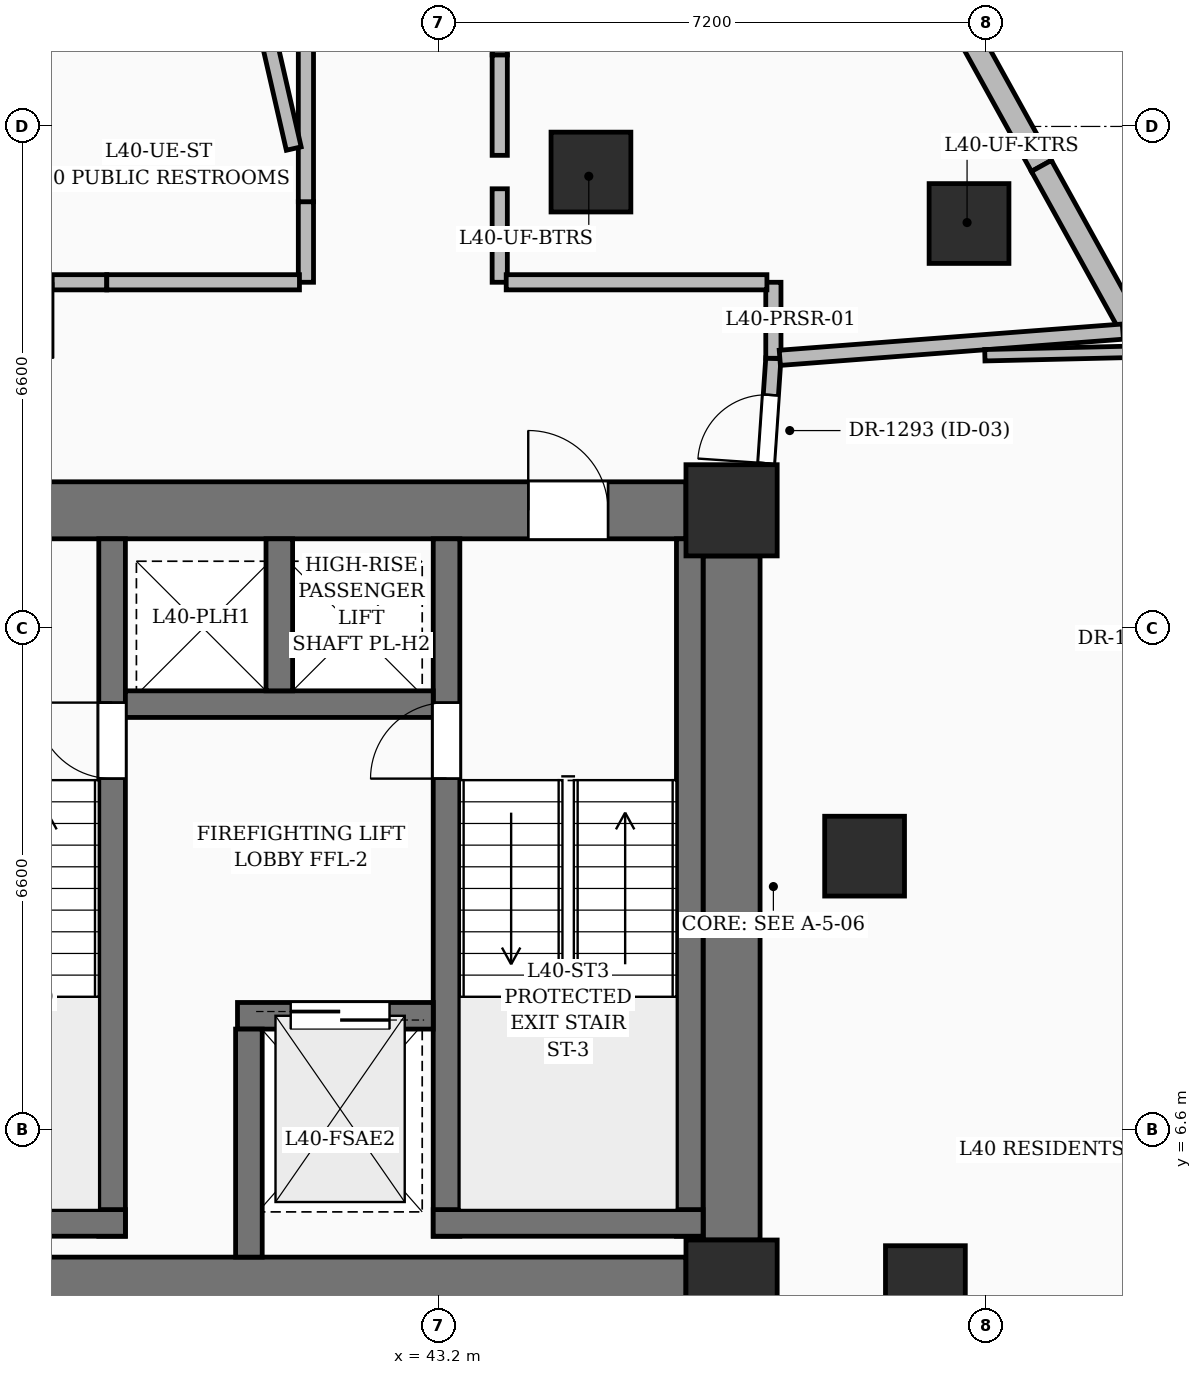
"""IFC4 building model, lengths in metres.
Left out: names, types, materials, properties, quantities, classifications, styles, units other than length and angle.
Written with IfcOpenShell. Run it as: python <this file> out.ifc"""

import sys

from ifc_helpers import new_model, si_unit, direction, frame, frame_2d, origin, origin_2d, place, context, subcontext, project, spatial, rectangle, extrude, element, fill, save


model = new_model("IFC4")
c1 = context("Model", 3, precision=1e-05, world=origin(), true_north=direction((0.0, 1.0)))
c2 = subcontext(c1, "Body", "Model", "MODEL_VIEW")
j1 = project(units=[si_unit("LENGTHUNIT", "METRE"), si_unit("PLANEANGLEUNIT", "RADIAN")], contexts=[c1])
p1 = place(None, origin())
s1 = spatial("IfcSite", under=j1, at=p1, CompositionType="ELEMENT")
p2 = place(p1, origin())
s2 = spatial("IfcBuilding", under=s1, at=p2, CompositionType="ELEMENT")
p3 = place(p2, frame((0.0, 0.0, 157.2)))
s3 = spatial("IfcBuildingStorey", under=s2, at=p3, CompositionType="ELEMENT", Elevation=157.2)
for number, where, z_axis, x_axis in (
    (1, (47.05, 4.55, 0.0), (0.0, 0.0, 1.0), (1.0, 0.0, 0.0)),
    (2, (47.05, 14.75, 0.0), (0.0, 0.0, 1.0), (1.0, 0.0, 0.0)),
):
    element("IfcColumn", number, at=place(p3, frame(where, z_axis=z_axis, x_axis=x_axis)), inside=s3, PredefinedType="COLUMN", context=c2, shape_type="SweptSolid", body=[
        extrude(rectangle(XDim=1.2, YDim=1.2, at=origin_2d()), origin(), (0.0, 0.0, 1.0), 3.6),
    ])
for number, where, z_axis, x_axis in (
    (3, (49.6, 4.55, 0.0), (0.0, 0.0, 1.0), (1.0, 0.0, 0.0)),
    (4, (48.8, 10.2, 0.0), (0.0, 0.0, 1.0), (1.0, 0.0, 0.0)),
    (5, (45.2, 19.2, 0.0), (0.0, 0.0, 1.0), (1.0, 0.0, 0.0)),
):
    element("IfcColumn", number, at=place(p3, frame(where, z_axis=z_axis, x_axis=x_axis)), inside=s3, PredefinedType="COLUMN", context=c2, shape_type="SweptSolid", body=[
        extrude(rectangle(XDim=1.05, YDim=1.05, at=origin_2d()), origin(), (0.0, 0.0, 1.0), 3.6),
    ])
p4 = place(p3, frame((35.75, 4.55, 0.0), z_axis=(0.0, 0.0, 1.0), x_axis=(1.0, 0.0, 0.0)))
e6 = element("IfcWall", 6, at=p4, inside=s3, PredefinedType="SHEAR", context=c2, shape_type="SweptSolid", body=[
    extrude(rectangle(XDim=10.7, YDim=0.75, at=frame_2d((5.35, 0.0))), origin(), (0.0, 0.0, 1.0), 3.6),
])
p5 = place(p3, frame((35.75, 14.75, 0.0), z_axis=(0.0, 0.0, 1.0), x_axis=(1.0, 0.0, 0.0)))
e7 = element("IfcWall", 7, at=p5, inside=s3, PredefinedType="SHEAR", context=c2, shape_type="SweptSolid", body=[
    extrude(rectangle(XDim=10.7, YDim=0.75, at=frame_2d((5.35, 0.0))), origin(), (0.0, 0.0, 1.0), 3.6),
])
p6 = place(p5, frame((1.025, 0.0, 0.0)))
e8 = element("IfcOpeningElement", 8, at=p6, cuts=e7, PredefinedType="OPENING", context=c2, shape_type="SweptSolid", body=[
    extrude(rectangle(XDim=1.05, YDim=2.15, at=frame_2d((0.525, 1.075))), frame((0.0, 0.385, 0.0), z_axis=(0.0, -1.0, 0.0), x_axis=(1.0, 0.0, 0.0)), (0.0, 0.0, 1.0), 0.77),
])
p7 = place(p5, frame((8.625, 0.0, 0.0)))
e9 = element("IfcOpeningElement", 9, at=p7, cuts=e7, PredefinedType="OPENING", context=c2, shape_type="SweptSolid", body=[
    extrude(rectangle(XDim=1.05, YDim=2.15, at=frame_2d((0.525, 1.075))), frame((0.0, 0.385, 0.0), z_axis=(0.0, -1.0, 0.0), x_axis=(1.0, 0.0, 0.0)), (0.0, 0.0, 1.0), 0.77),
])
p8 = place(p3, frame((47.05, 5.15, 0.0), z_axis=(0.0, 0.0, 1.0), x_axis=(0.0, 1.0, 0.0)))
e10 = element("IfcWall", 10, at=p8, inside=s3, PredefinedType="SHEAR", context=c2, shape_type="SweptSolid", body=[
    extrude(rectangle(XDim=9.0, YDim=0.75, at=frame_2d((4.5, 0.0))), origin(), (0.0, 0.0, 1.0), 3.6),
])
p9 = place(p3, frame((38.9, 5.2, 0.0), z_axis=(0.0, 0.0, 1.0), x_axis=(0.0, 1.0, 0.0)))
e11 = element("IfcWall", 11, at=p9, inside=s3, PredefinedType="SOLIDWALL", context=c2, shape_type="SweptSolid", body=[
    extrude(rectangle(XDim=9.175, YDim=0.35, at=frame_2d((4.587, 0.0))), origin(), (0.0, 0.0, 1.0), 3.6),
])
p10 = place(p9, frame((6.02, 0.0, 0.0)))
e12 = element("IfcOpeningElement", 12, at=p10, cuts=e11, PredefinedType="OPENING", context=c2, shape_type="SweptSolid", body=[
    extrude(rectangle(XDim=1.0, YDim=2.15, at=frame_2d((0.5, 1.075))), frame((0.0, 0.185, 0.0), z_axis=(0.0, -1.0, 0.0), x_axis=(1.0, 0.0, 0.0)), (0.0, 0.0, 1.0), 0.37),
])
p11 = place(p3, frame((35.525, 5.375, 0.0), z_axis=(0.0, 0.0, 1.0), x_axis=(1.0, 0.0, 0.0)))
e13 = element("IfcWall", 13, at=p11, inside=s3, PredefinedType="SOLIDWALL", context=c2, shape_type="SweptSolid", body=[
    extrude(rectangle(XDim=3.55, YDim=0.35, at=frame_2d((1.775, 0.0))), origin(), (0.0, 0.0, 1.0), 3.6),
])
p12 = place(p3, frame((43.3, 5.2, 0.0), z_axis=(0.0, 0.0, 1.0), x_axis=(0.0, 1.0, 0.0)))
e14 = element("IfcWall", 14, at=p12, inside=s3, PredefinedType="SOLIDWALL", context=c2, shape_type="SweptSolid", body=[
    extrude(rectangle(XDim=9.175, YDim=0.35, at=frame_2d((4.587, 0.0))), origin(), (0.0, 0.0, 1.0), 3.6),
])
p13 = place(p12, frame((6.02, 0.0, 0.0)))
e15 = element("IfcOpeningElement", 15, at=p13, cuts=e14, PredefinedType="OPENING", context=c2, shape_type="SweptSolid", body=[
    extrude(rectangle(XDim=1.0, YDim=2.15, at=frame_2d((0.5, 1.075))), frame((0.0, 0.185, 0.0), z_axis=(0.0, -1.0, 0.0), x_axis=(1.0, 0.0, 0.0)), (0.0, 0.0, 1.0), 0.37),
])
p14 = place(p3, frame((46.5, 5.2, 0.0), z_axis=(0.0, 0.0, 1.0), x_axis=(0.0, 1.0, 0.0)))
e16 = element("IfcWall", 16, at=p14, inside=s3, PredefinedType="SOLIDWALL", context=c2, shape_type="SweptSolid", body=[
    extrude(rectangle(XDim=9.175, YDim=0.35, at=frame_2d((4.587, 0.0))), origin(), (0.0, 0.0, 1.0), 3.6),
])
p15 = place(p3, frame((43.125, 5.375, 0.0), z_axis=(0.0, 0.0, 1.0), x_axis=(1.0, 0.0, 0.0)))
e17 = element("IfcWall", 17, at=p15, inside=s3, PredefinedType="SOLIDWALL", context=c2, shape_type="SweptSolid", body=[
    extrude(rectangle(XDim=3.55, YDim=0.35, at=frame_2d((1.775, 0.0))), origin(), (0.0, 0.0, 1.0), 3.6),
])
p16 = place(p3, frame((40.55, 8.1, 0.0), z_axis=(0.0, 0.0, 1.0), x_axis=(1.0, 0.0, 0.0)))
e18 = element("IfcWall", 18, at=p16, inside=s3, PredefinedType="SOLIDWALL", context=c2, shape_type="SweptSolid", body=[
    extrude(rectangle(XDim=2.575, YDim=0.35, at=frame_2d((1.288, 0.0))), origin(), (0.0, 0.0, 1.0), 3.6),
])
p17 = place(p16, frame((0.7, 0.0, 0.0)))
e19 = element("IfcOpeningElement", 19, at=p17, cuts=e18, PredefinedType="OPENING", context=c2, shape_type="SweptSolid", body=[
    extrude(rectangle(XDim=1.3, YDim=2.25, at=frame_2d((0.65, 1.125))), frame((0.0, 0.185, 0.0), z_axis=(0.0, -1.0, 0.0), x_axis=(1.0, 0.0, 0.0)), (0.0, 0.0, 1.0), 0.37),
])
p18 = place(p3, frame((40.7, 4.925, 0.0), z_axis=(0.0, 0.0, 1.0), x_axis=(0.0, 1.0, 0.0)))
e20 = element("IfcWall", 20, at=p18, inside=s3, PredefinedType="SOLIDWALL", context=c2, shape_type="SweptSolid", body=[
    extrude(rectangle(XDim=3.0, YDim=0.35, at=frame_2d((1.5, 0.0))), origin(), (0.0, 0.0, 1.0), 3.6),
])
p19 = place(p3, frame((39.075, 12.2, 0.0), z_axis=(0.0, 0.0, 1.0), x_axis=(1.0, 0.0, 0.0)))
e21 = element("IfcWall", 21, at=p19, inside=s3, PredefinedType="SOLIDWALL", context=c2, shape_type="SweptSolid", body=[
    extrude(rectangle(XDim=4.05, YDim=0.35, at=frame_2d((2.025, 0.0))), origin(), (0.0, 0.0, 1.0), 3.6),
])
p20 = place(p3, frame((41.1, 12.375, 0.0), z_axis=(0.0, 0.0, 1.0), x_axis=(0.0, 1.0, 0.0)))
e22 = element("IfcWall", 22, at=p20, inside=s3, PredefinedType="SOLIDWALL", context=c2, shape_type="SweptSolid", body=[
    extrude(rectangle(XDim=2.0, YDim=0.35, at=frame_2d((1.0, 0.0))), origin(), (0.0, 0.0, 1.0), 3.6),
])
p21 = place(p3, frame((50.174, 18.523, 0.0), z_axis=(0.0, 0.0, 1.0), x_axis=(1.0, 0.0, 0.0)))
e23 = element("IfcColumn", 23, at=p21, inside=s3, PredefinedType="COLUMN", context=c2, shape_type="SweptSolid", body=[
    extrude(rectangle(XDim=1.05, YDim=1.05, at=origin_2d()), origin(), (0.0, 0.0, 1.0), 3.6),
])
p22 = place(p3, frame((47.36, 26.087, 0.0), z_axis=(0.0, 0.0, 1.0), x_axis=(0.484182040501, -0.874967286049, 0.0)))
e24 = element("IfcWall", 24, at=p22, inside=s3, PredefinedType="SOLIDWALL", context=c2, shape_type="SweptSolid", body=[
    extrude(rectangle(XDim=7.779, YDim=0.3, at=frame_2d((3.89, 0.0))), origin(), (0.0, 0.0, 1.0), 3.35),
])
p23 = place(p22, frame((2.295, 0.0, 0.6)))
e25 = element("IfcOpeningElement", 25, at=p23, cuts=e24, PredefinedType="OPENING", context=c2, shape_type="SweptSolid", body=[
    extrude(rectangle(XDim=2.4, YDim=2.1, at=frame_2d((1.2, 1.05))), frame((0.0, 0.16, 0.0), z_axis=(0.0, -1.0, 0.0), x_axis=(1.0, 0.0, 0.0)), (0.0, 0.0, 1.0), 0.32),
])
p24 = place(p3, frame((51.126, 19.281, 0.0), z_axis=(0.0, 0.0, 1.0), x_axis=(0.484181305153, -0.87496769297, 0.0)))
e26 = element("IfcWall", 26, at=p24, inside=s3, PredefinedType="SOLIDWALL", context=c2, shape_type="SweptSolid", body=[
    extrude(rectangle(XDim=8.059, YDim=0.3, at=frame_2d((4.03, 0.0))), origin(), (0.0, 0.0, 1.0), 3.35),
])
p25 = place(p24, frame((5.335, 0.0, 0.0)))
e27 = element("IfcOpeningElement", 27, at=p25, cuts=e26, PredefinedType="OPENING", context=c2, shape_type="SweptSolid", body=[
    extrude(rectangle(XDim=1.0, YDim=2.2, at=frame_2d((0.5, 1.1))), frame((0.0, 0.16, 0.0), z_axis=(0.0, -1.0, 0.0), x_axis=(1.0, 0.0, 0.0)), (0.0, 0.0, 1.0), 0.32),
])
p26 = place(p3, frame((47.425, 14.2, 0.0), z_axis=(0.0, 0.0, 1.0), x_axis=(0.068484119878, 0.997652206595, 0.0)))
e28 = element("IfcWall", 28, at=p26, inside=s3, PredefinedType="PARTITIONING", context=c2, shape_type="SweptSolid", body=[
    extrude(rectangle(XDim=2.556, YDim=0.2, at=frame_2d((1.278, 0.0))), origin(), (0.0, 0.0, 1.0), 2.393),
])
p27 = place(p26, frame((1.172, 0.0, 0.0)))
e29 = element("IfcOpeningElement", 29, at=p27, cuts=e28, PredefinedType="OPENING", context=c2, shape_type="SweptSolid", body=[
    extrude(rectangle(XDim=0.9, YDim=2.1, at=frame_2d((0.45, 1.05))), frame((0.0, 0.11, 0.0), z_axis=(0.0, -1.0, 0.0), x_axis=(1.0, 0.0, 0.0)), (0.0, 0.0, 1.0), 0.22),
])
p28 = place(p3, frame((38.83, 17.75, 0.0), z_axis=(0.0, 0.0, 1.0), x_axis=(-1.0, 0.0, 0.0)))
e30 = element("IfcWall", 30, at=p28, inside=s3, PredefinedType="PARTITIONING", context=c2, shape_type="SweptSolid", body=[
    extrude(rectangle(XDim=2.41, YDim=0.2, at=frame_2d((1.205, 0.0))), origin(), (0.0, 0.0, 1.0), 3.35),
])
p29 = place(p28, frame((0.705, 0.0, 0.0)))
e31 = element("IfcOpeningElement", 31, at=p29, cuts=e30, PredefinedType="OPENING", context=c2, shape_type="SweptSolid", body=[
    extrude(rectangle(XDim=1.0, YDim=2.2, at=frame_2d((0.5, 1.1))), frame((0.0, 0.11, 0.0), z_axis=(0.0, -1.0, 0.0), x_axis=(1.0, 0.0, 0.0)), (0.0, 0.0, 1.0), 0.22),
])
p30 = place(p3, frame((41.45, 18.81, 0.0), z_axis=(0.0, 0.0, 1.0), x_axis=(0.0, -1.0, 0.0)))
e32 = element("IfcWall", 32, at=p30, inside=s3, PredefinedType="PARTITIONING", context=c2, shape_type="SweptSolid", body=[
    extrude(rectangle(XDim=1.06, YDim=0.2, at=frame_2d((0.53, 0.0))), origin(), (0.0, 0.0, 1.0), 3.35),
])
p31 = place(p3, frame((41.365, 17.75, 0.0), z_axis=(0.0, 0.0, 1.0), x_axis=(-1.0, 0.0, 0.0)))
e33 = element("IfcWall", 33, at=p31, inside=s3, PredefinedType="PARTITIONING", context=c2, shape_type="SweptSolid", body=[
    extrude(rectangle(XDim=2.535, YDim=0.2, at=frame_2d((1.268, 0.0))), origin(), (0.0, 0.0, 1.0), 3.35),
])
p32 = place(p3, frame((44.0, 20.74, 0.0), z_axis=(0.0, 0.0, 1.0), x_axis=(0.0, 1.0, 0.0)))
e34 = element("IfcWall", 34, at=p32, inside=s3, PredefinedType="PARTITIONING", context=c2, shape_type="SweptSolid", body=[
    extrude(rectangle(XDim=2.86, YDim=0.2, at=frame_2d((1.43, 0.0))), origin(), (0.0, 0.0, 1.0), 2.436),
])
p33 = place(p32, frame((0.93, 0.0, 0.0)))
e35 = element("IfcOpeningElement", 35, at=p33, cuts=e34, PredefinedType="OPENING", context=c2, shape_type="SweptSolid", body=[
    extrude(rectangle(XDim=1.0, YDim=2.2, at=frame_2d((0.5, 1.1))), frame((0.0, 0.11, 0.0), z_axis=(0.0, -1.0, 0.0), x_axis=(1.0, 0.0, 0.0)), (0.0, 0.0, 1.0), 0.22),
])
p34 = place(p3, frame((47.6, 16.75, 0.0), z_axis=(0.0, 0.0, 1.0), x_axis=(0.0, 1.0, 0.0)))
e36 = element("IfcWall", 36, at=p34, inside=s3, PredefinedType="PARTITIONING", context=c2, shape_type="SweptSolid", body=[
    extrude(rectangle(XDim=1.0, YDim=0.2, at=frame_2d((0.5, 0.0))), origin(), (0.0, 0.0, 1.0), 3.01),
])
p35 = place(p3, frame((44.0, 17.75, 0.0), z_axis=(0.0, 0.0, 1.0), x_axis=(0.0, 1.0, 0.0)))
e37 = element("IfcWall", 37, at=p35, inside=s3, PredefinedType="PARTITIONING", context=c2, shape_type="SweptSolid", body=[
    extrude(rectangle(XDim=1.23, YDim=0.2, at=frame_2d((0.615, 0.0))), origin(), (0.0, 0.0, 1.0), 3.35),
])
p36 = place(p3, frame((41.45, 23.515, 0.0), z_axis=(0.0, 0.0, 1.0), x_axis=(0.0, -1.0, 0.0)))
e38 = element("IfcWall", 38, at=p36, inside=s3, PredefinedType="PARTITIONING", context=c2, shape_type="SweptSolid", body=[
    extrude(rectangle(XDim=4.705, YDim=0.2, at=frame_2d((2.353, 0.0))), origin(), (0.0, 0.0, 1.0), 3.35),
])
p37 = place(p36, frame((0.176, 0.0, 0.0)))
e39 = element("IfcOpeningElement", 39, at=p37, cuts=e38, PredefinedType="OPENING", context=c2, shape_type="SweptSolid", body=[
    extrude(rectangle(XDim=1.6, YDim=2.3, at=frame_2d((0.8, 1.15))), frame((0.0, 0.11, 0.0), z_axis=(0.0, -1.0, 0.0), x_axis=(1.0, 0.0, 0.0)), (0.0, 0.0, 1.0), 0.22),
])
p38 = place(p3, frame((52.198, 17.101, 0.0), z_axis=(0.0, 0.0, 1.0), x_axis=(-0.997091490512, -0.076213906529, 0.0)))
e40 = element("IfcWall", 40, at=p38, inside=s3, PredefinedType="PARTITIONING", context=c2, shape_type="SweptSolid", body=[
    extrude(rectangle(XDim=4.526, YDim=0.2, at=frame_2d((2.263, 0.0))), origin(), (0.0, 0.0, 1.0), 2.393),
])
p39 = place(p3, frame((41.29, 19.509, 0.0), z_axis=(0.0, 0.0, 1.0), x_axis=(-0.223291159638, 0.974751793036, 0.0)))
e41 = element("IfcWall", 41, at=p39, inside=s3, PredefinedType="PARTITIONING", context=c2, shape_type="SweptSolid", body=[
    extrude(rectangle(XDim=1.478, YDim=0.2, at=frame_2d((0.739, 0.0))), origin(), (0.0, 0.0, 1.0), 3.35),
])
p40 = place(p3, frame((47.515, 17.75, 0.0), z_axis=(0.0, 0.0, 1.0), x_axis=(-1.0, 0.0, 0.0)))
e42 = element("IfcWall", 42, at=p40, inside=s3, PredefinedType="PARTITIONING", context=c2, shape_type="SweptSolid", body=[
    extrude(rectangle(XDim=3.43, YDim=0.2, at=frame_2d((1.715, 0.0))), origin(), (0.0, 0.0, 1.0), 2.436),
])
p41 = place(p3, frame((44.0, 19.42, 0.0), z_axis=(0.0, 0.0, 1.0), x_axis=(0.0, 1.0, 0.0)))
e43 = element("IfcWall", 43, at=p41, inside=s3, PredefinedType="PARTITIONING", context=c2, shape_type="SweptSolid", body=[
    extrude(rectangle(XDim=1.32, YDim=0.2, at=frame_2d((0.66, 0.0))), origin(), (0.0, 0.0, 1.0), 3.35),
])
p42 = place(p3, frame((52.349, 16.836, 0.0), z_axis=(0.0, 0.0, 1.0), x_axis=(-0.999727879239, -0.023327397455, 0.0)))
e44 = element("IfcWall", 44, at=p42, inside=s3, PredefinedType="PARTITIONING", context=c2, shape_type="SweptSolid", body=[
    extrude(rectangle(XDim=1.968, YDim=0.15, at=frame_2d((0.984, 0.0))), origin(), (0.0, 0.0, 1.0), 2.393),
])
p43 = place(p7, origin())
e45 = element("IfcDoor", 45, at=p43, inside=s3, OperationType="SINGLE_SWING_LEFT", PredefinedType="DOOR", context=c2, shape_type="SweptSolid", body=[
    extrude(rectangle(XDim=1.05, YDim=2.15, at=frame_2d((0.525, 1.075))), frame((0.0, 0.025, 0.0), z_axis=(0.0, -1.0, 0.0), x_axis=(1.0, 0.0, 0.0)), (0.0, 0.0, 1.0), 0.05),
])
fill(e9, e45)
p44 = place(p10, origin())
e46 = element("IfcDoor", 46, at=p44, inside=s3, OperationType="SINGLE_SWING_RIGHT", PredefinedType="DOOR", context=c2, shape_type="SweptSolid", body=[
    extrude(rectangle(XDim=1.0, YDim=2.15, at=frame_2d((0.5, 1.075))), frame((0.0, 0.025, 0.0), z_axis=(0.0, -1.0, 0.0), x_axis=(1.0, 0.0, 0.0)), (0.0, 0.0, 1.0), 0.05),
])
fill(e12, e46)
p45 = place(p13, origin())
e47 = element("IfcDoor", 47, at=p45, inside=s3, OperationType="SINGLE_SWING_LEFT", PredefinedType="DOOR", context=c2, shape_type="SweptSolid", body=[
    extrude(rectangle(XDim=1.0, YDim=2.15, at=frame_2d((0.5, 1.075))), frame((0.0, 0.025, 0.0), z_axis=(0.0, -1.0, 0.0), x_axis=(1.0, 0.0, 0.0)), (0.0, 0.0, 1.0), 0.05),
])
fill(e15, e47)
p46 = place(p17, origin())
e48 = element("IfcDoor", 48, at=p46, inside=s3, OperationType="DOUBLE_DOOR_SLIDING", PredefinedType="DOOR", context=c2, shape_type="SweptSolid", body=[
    extrude(rectangle(XDim=1.3, YDim=2.25, at=frame_2d((0.65, 1.125))), frame((0.0, 0.025, 0.0), z_axis=(0.0, -1.0, 0.0), x_axis=(1.0, 0.0, 0.0)), (0.0, 0.0, 1.0), 0.05),
])
fill(e19, e48)
p47 = place(p27, origin())
e49 = element("IfcDoor", 49, at=p47, inside=s3, OperationType="SINGLE_SWING_LEFT", PredefinedType="DOOR", context=c2, shape_type="SweptSolid", body=[
    extrude(rectangle(XDim=0.9, YDim=2.1, at=frame_2d((0.45, 1.05))), frame((0.0, 0.025, 0.0), z_axis=(0.0, -1.0, 0.0), x_axis=(1.0, 0.0, 0.0)), (0.0, 0.0, 1.0), 0.05),
])
fill(e29, e49)
p48 = place(p29, origin())
e50 = element("IfcDoor", 50, at=p48, inside=s3, OperationType="SINGLE_SWING_LEFT", PredefinedType="DOOR", context=c2, shape_type="SweptSolid", body=[
    extrude(rectangle(XDim=1.0, YDim=2.2, at=frame_2d((0.5, 1.1))), frame((0.0, 0.025, 0.0), z_axis=(0.0, -1.0, 0.0), x_axis=(1.0, 0.0, 0.0)), (0.0, 0.0, 1.0), 0.05),
])
fill(e31, e50)
save(model, sys.argv[1])
